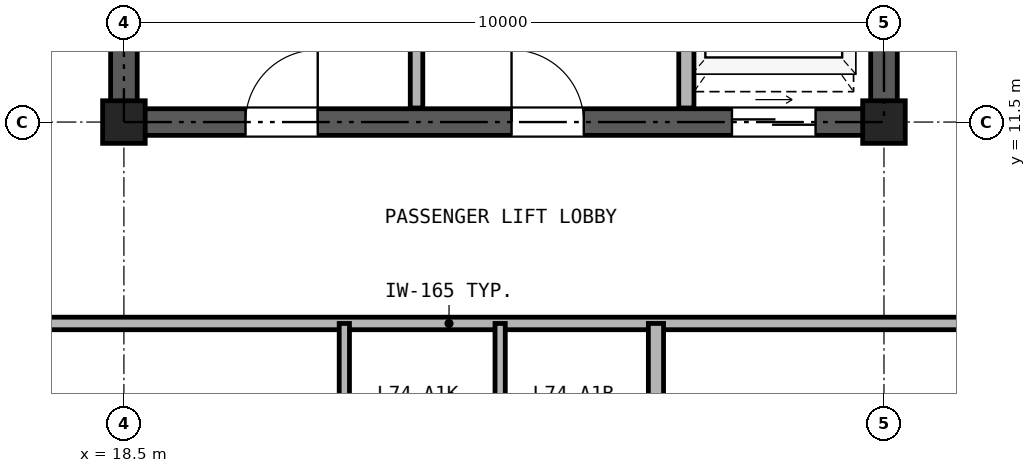
"""IFC4 building model, lengths in metres.
Left out: names, types, materials, properties, quantities, classifications, styles, units other than length and angle.
Written with IfcOpenShell. Run it as: python <this file> out.ifc"""

import sys

from ifc_helpers import new_model, si_unit, direction, frame, frame_2d, origin, origin_2d, place, context, subcontext, project, spatial, rectangle, hollow_rectangle, extrude, source, transform, mapped, element, fill, save


model = new_model("IFC4")
c1 = context("Model", 3, precision=1e-05, world=origin(), true_north=direction((0.0, 1.0)))
c2 = subcontext(c1, "Body", "Model", "MODEL_VIEW")
j1 = project(units=[si_unit("LENGTHUNIT", "METRE"), si_unit("PLANEANGLEUNIT", "RADIAN")], contexts=[c1])
p1 = place(None, origin())
s1 = spatial("IfcSite", under=j1, at=p1, CompositionType="ELEMENT")
p2 = place(p1, origin())
s2 = spatial("IfcBuilding", under=s1, at=p2, CompositionType="ELEMENT")
p3 = place(p2, frame((0.0, 0.0, 258.5)))
s3 = spatial("IfcBuildingStorey", under=s2, at=p3, CompositionType="ELEMENT", Elevation=258.5)
m1 = source(origin(), c2, "Body", "SweptSolid", [
    extrude(hollow_rectangle(XDim=0.56, YDim=0.56, WallThickness=0.03, at=origin_2d()), origin(), (0.0, 0.0, 1.0), 2.98),
])
for number, where, z_axis, x_axis in (
    (1, (18.5, 11.5, 0.0), (0.0, 0.0, 1.0), (1.0, 0.0, 0.0)),
    (2, (28.5, 11.5, 0.0), (0.0, 0.0, 1.0), (1.0, 0.0, 0.0)),
):
    element("IfcColumn", number, at=place(p3, frame(where, z_axis=z_axis, x_axis=x_axis)), inside=s3, PredefinedType="COLUMN", context=c2, shape_type="MappedRepresentation", body=[
        mapped(m1, transform((0.0, 0.0, 0.0), x_axis=(1.0, 0.0, 0.0), y_axis=(0.0, 1.0, 0.0), z_axis=(0.0, 0.0, 1.0), scale=1.0)),
    ])
p4 = place(p3, frame((18.325, 11.5, 0.0), z_axis=(0.0, 0.0, 1.0), x_axis=(1.0, 0.0, 0.0)))
e3 = element("IfcWall", 3, at=p4, inside=s3, PredefinedType="SHEAR", context=c2, shape_type="SweptSolid", body=[
    extrude(rectangle(XDim=10.35, YDim=0.35, at=frame_2d((5.175, 0.0))), origin(), (0.0, 0.0, 1.0), 2.98),
])
p5 = place(p4, frame((1.775, 0.0, 0.0)))
e4 = element("IfcOpeningElement", 4, at=p5, cuts=e3, PredefinedType="OPENING", context=c2, shape_type="SweptSolid", body=[
    extrude(rectangle(XDim=0.95, YDim=2.15, at=frame_2d((0.475, 1.075))), frame((0.0, 0.185, 0.0), z_axis=(0.0, -1.0, 0.0), x_axis=(1.0, 0.0, 0.0)), (0.0, 0.0, 1.0), 0.37),
])
p6 = place(p4, frame((5.275, 0.0, 0.0)))
e5 = element("IfcOpeningElement", 5, at=p6, cuts=e3, PredefinedType="OPENING", context=c2, shape_type="SweptSolid", body=[
    extrude(rectangle(XDim=0.95, YDim=2.15, at=frame_2d((0.475, 1.075))), frame((0.0, 0.185, 0.0), z_axis=(0.0, -1.0, 0.0), x_axis=(1.0, 0.0, 0.0)), (0.0, 0.0, 1.0), 0.37),
])
p7 = place(p4, frame((8.175, 0.0, 0.0)))
e6 = element("IfcOpeningElement", 6, at=p7, cuts=e3, PredefinedType="OPENING", context=c2, shape_type="SweptSolid", body=[
    extrude(rectangle(XDim=1.1, YDim=2.25, at=frame_2d((0.55, 1.125))), frame((0.0, 0.185, 0.0), z_axis=(0.0, -1.0, 0.0), x_axis=(1.0, 0.0, 0.0)), (0.0, 0.0, 1.0), 0.37),
])
p8 = place(p3, frame((18.5, 11.675, 0.0), z_axis=(0.0, 0.0, 1.0), x_axis=(0.0, 1.0, 0.0)))
e7 = element("IfcWall", 7, at=p8, inside=s3, PredefinedType="SHEAR", context=c2, shape_type="SweptSolid", body=[
    extrude(rectangle(XDim=16.9, YDim=0.35, at=frame_2d((8.45, 0.0))), origin(), (0.0, 0.0, 1.0), 2.98),
])
p9 = place(p8, frame((7.475, 0.0, 0.0)))
e8 = element("IfcOpeningElement", 8, at=p9, cuts=e7, PredefinedType="OPENING", context=c2, shape_type="SweptSolid", body=[
    extrude(rectangle(XDim=1.15, YDim=2.2, at=frame_2d((0.575, 1.1))), frame((0.0, 0.185, 0.0), z_axis=(0.0, -1.0, 0.0), x_axis=(1.0, 0.0, 0.0)), (0.0, 0.0, 1.0), 0.37),
])
p10 = place(p3, frame((28.5, 11.675, 0.0), z_axis=(0.0, 0.0, 1.0), x_axis=(0.0, 1.0, 0.0)))
e9 = element("IfcWall", 9, at=p10, inside=s3, PredefinedType="SHEAR", context=c2, shape_type="SweptSolid", body=[
    extrude(rectangle(XDim=16.9, YDim=0.35, at=frame_2d((8.45, 0.0))), origin(), (0.0, 0.0, 1.0), 2.98),
])
p11 = place(p10, frame((7.475, 0.0, 0.0)))
e10 = element("IfcOpeningElement", 10, at=p11, cuts=e9, PredefinedType="OPENING", context=c2, shape_type="SweptSolid", body=[
    extrude(rectangle(XDim=1.15, YDim=2.2, at=frame_2d((0.575, 1.1))), frame((0.0, 0.185, 0.0), z_axis=(0.0, -1.0, 0.0), x_axis=(1.0, 0.0, 0.0)), (0.0, 0.0, 1.0), 0.37),
])
p12 = place(p3, frame((22.35, 11.685, 0.0), z_axis=(0.0, 0.0, 1.0), x_axis=(0.0, 1.0, 0.0)))
e11 = element("IfcWall", 11, at=p12, inside=s3, PredefinedType="PARTITIONING", context=c2, shape_type="SweptSolid", body=[
    extrude(rectangle(XDim=3.315, YDim=0.165, at=frame_2d((1.657, 0.0))), origin(), (0.0, 0.0, 1.0), 2.98),
])
p13 = place(p3, frame((25.9, 11.685, 0.0), z_axis=(0.0, 0.0, 1.0), x_axis=(0.0, 1.0, 0.0)))
e12 = element("IfcWall", 12, at=p13, inside=s3, PredefinedType="PARTITIONING", context=c2, shape_type="SweptSolid", body=[
    extrude(rectangle(XDim=3.315, YDim=0.2, at=frame_2d((1.657, 0.0))), origin(), (0.0, 0.0, 1.0), 2.98),
])
p14 = place(p3, frame((5.36, 8.85, 0.0), z_axis=(0.0, 0.0, 1.0), x_axis=(1.0, 0.0, 0.0)))
e13 = element("IfcWall", 13, at=p14, inside=s3, PredefinedType="PARTITIONING", context=c2, shape_type="SweptSolid", body=[
    extrude(rectangle(XDim=36.28, YDim=0.165, at=frame_2d((18.14, 0.0))), origin(), (0.0, 0.0, 1.0), 2.98),
])
p15 = place(p14, frame((9.17, 0.0, 0.0)))
e14 = element("IfcOpeningElement", 14, at=p15, cuts=e13, PredefinedType="OPENING", context=c2, shape_type="SweptSolid", body=[
    extrude(rectangle(XDim=1.0, YDim=2.15, at=frame_2d((0.5, 1.075))), frame((0.0, 0.093, 0.0), z_axis=(0.0, -1.0, 0.0), x_axis=(1.0, 0.0, 0.0)), (0.0, 0.0, 1.0), 0.185),
])
p16 = place(p14, frame((24.665, 0.0, 0.0)))
e15 = element("IfcOpeningElement", 15, at=p16, cuts=e13, PredefinedType="OPENING", context=c2, shape_type="SweptSolid", body=[
    extrude(rectangle(XDim=1.0, YDim=2.15, at=frame_2d((0.5, 1.075))), frame((0.0, 0.093, 0.0), z_axis=(0.0, -1.0, 0.0), x_axis=(1.0, 0.0, 0.0)), (0.0, 0.0, 1.0), 0.185),
])
for number, where, z_axis, x_axis in (
    (16, (21.4, 6.7, 0.0), (0.0, 0.0, 1.0), (0.0, 1.0, 0.0)),
    (17, (23.45, 6.7, 0.0), (0.0, 0.0, 1.0), (0.0, 1.0, 0.0)),
):
    element("IfcWall", number, at=place(p3, frame(where, z_axis=z_axis, x_axis=x_axis)), inside=s3, PredefinedType="PARTITIONING", context=c2, shape_type="SweptSolid", body=[
        extrude(rectangle(XDim=2.15, YDim=0.135, at=frame_2d((1.075, 0.0))), origin(), (0.0, 0.0, 1.0), 2.98),
    ])
p17 = place(p3, frame((25.5, 0.16, 0.0), z_axis=(0.0, 0.0, 1.0), x_axis=(0.0, 1.0, 0.0)))
e18 = element("IfcWall", 18, at=p17, inside=s3, PredefinedType="PARTITIONING", context=c2, shape_type="SweptSolid", body=[
    extrude(rectangle(XDim=8.69, YDim=0.2, at=frame_2d((4.345, 0.0))), origin(), (0.0, 0.0, 1.0), 2.98),
])
p18 = place(p5, frame((0.95, 0.0, 0.0), z_axis=(0.0, 0.0, 1.0), x_axis=(-1.0, 0.0, 0.0)))
e19 = element("IfcDoor", 19, at=p18, inside=s3, OperationType="SINGLE_SWING_RIGHT", PredefinedType="DOOR", context=c2, shape_type="SweptSolid", body=[
    extrude(rectangle(XDim=0.95, YDim=2.15, at=frame_2d((0.475, 1.075))), frame((0.0, 0.025, 0.0), z_axis=(0.0, -1.0, 0.0), x_axis=(1.0, 0.0, 0.0)), (0.0, 0.0, 1.0), 0.05),
])
fill(e4, e19)
p19 = place(p6, frame((0.95, 0.0, 0.0), z_axis=(0.0, 0.0, 1.0), x_axis=(-1.0, 0.0, 0.0)))
e20 = element("IfcDoor", 20, at=p19, inside=s3, OperationType="SINGLE_SWING_LEFT", PredefinedType="DOOR", context=c2, shape_type="SweptSolid", body=[
    extrude(rectangle(XDim=0.95, YDim=2.15, at=frame_2d((0.475, 1.075))), frame((0.0, 0.025, 0.0), z_axis=(0.0, -1.0, 0.0), x_axis=(1.0, 0.0, 0.0)), (0.0, 0.0, 1.0), 0.05),
])
fill(e5, e20)
p20 = place(p7, frame((1.1, 0.0, 0.0), z_axis=(0.0, 0.0, 1.0), x_axis=(-1.0, 0.0, 0.0)))
e21 = element("IfcDoor", 21, at=p20, inside=s3, OperationType="DOUBLE_DOOR_SLIDING", PredefinedType="DOOR", context=c2, shape_type="SweptSolid", body=[
    extrude(rectangle(XDim=1.1, YDim=2.25, at=frame_2d((0.55, 1.125))), frame((0.0, 0.025, 0.0), z_axis=(0.0, -1.0, 0.0), x_axis=(1.0, 0.0, 0.0)), (0.0, 0.0, 1.0), 0.05),
])
fill(e6, e21)
save(model, sys.argv[1])
